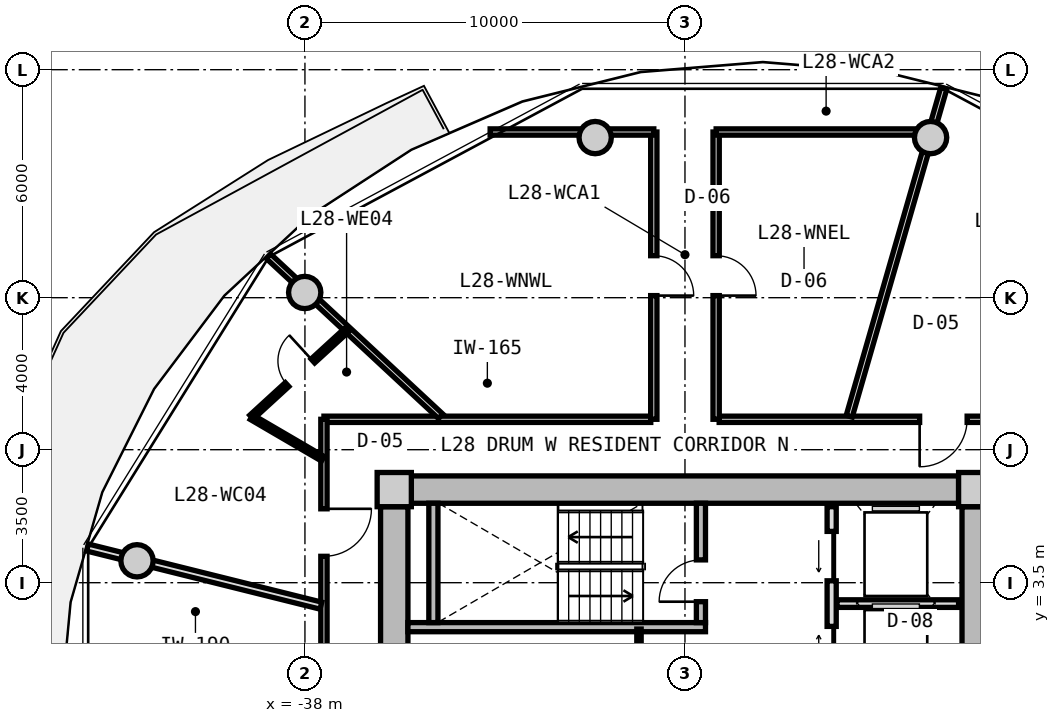
"""IFC4 building model, lengths in metres.
Left out: names, types, materials, properties, quantities, classifications, styles, units other than length and angle.
Written with IfcOpenShell. Run it as: python <this file> out.ifc"""

import sys

from ifc_helpers import new_model, si_unit, direction, frame, frame_2d, origin, origin_2d, place, context, subcontext, project, spatial, rectangle, circle, extrude, source, transform, mapped, element, fill, save


model = new_model("IFC4")
c1 = context("Model", 3, precision=1e-05, world=origin(), true_north=direction((0.0, 1.0)))
c2 = subcontext(c1, "Body", "Model", "MODEL_VIEW")
j1 = project(units=[si_unit("LENGTHUNIT", "METRE"), si_unit("PLANEANGLEUNIT", "RADIAN")], contexts=[c1])
p1 = place(None, origin())
s1 = spatial("IfcSite", under=j1, at=p1, CompositionType="ELEMENT")
p2 = place(p1, origin())
s2 = spatial("IfcBuilding", under=s1, at=p2, CompositionType="ELEMENT")
p3 = place(p2, frame((0.0, 0.0, 93.2)))
s3 = spatial("IfcBuildingStorey", under=s2, at=p3, CompositionType="ELEMENT", Elevation=93.2)
m1 = source(origin(), c2, "Body", "SweptSolid", [
    extrude(rectangle(XDim=0.9, YDim=0.9, at=origin_2d()), origin(), (0.0, 0.0, 1.0), 3.05),
])
for number, where, z_axis, x_axis in (
    (1, (-20.35, 5.95, 0.0), (0.0, 0.0, 1.0), (1.0, 0.0, 0.0)),
    (2, (-35.65, 5.95, 0.0), (0.0, 0.0, 1.0), (1.0, 0.0, 0.0)),
):
    element("IfcColumn", number, at=place(p3, frame(where, z_axis=z_axis, x_axis=x_axis)), inside=s3, PredefinedType="COLUMN", context=c2, shape_type="MappedRepresentation", body=[
        mapped(m1, transform((0.0, 0.0, 0.0), x_axis=(1.0, 0.0, 0.0), y_axis=(0.0, 1.0, 0.0), z_axis=(0.0, 0.0, 1.0), scale=1.0)),
    ])
m2 = source(origin(), c2, "Body", "SweptSolid", [
    extrude(rectangle(XDim=14.4, YDim=0.72, at=frame_2d((7.2, 0.0))), origin(), (0.0, 0.0, 1.0), 2.79),
])
p4 = place(p3, frame((-35.2, 5.95, 0.0), z_axis=(0.0, 0.0, 1.0), x_axis=(1.0, 0.0, 0.0)))
e3 = element("IfcWall", 3, at=p4, inside=s3, PredefinedType="SHEAR", context=c2, shape_type="MappedRepresentation", body=[
    mapped(m2, transform((0.0, 0.0, 0.0), x_axis=(1.0, 0.0, 0.0), y_axis=(0.0, 1.0, 0.0), z_axis=(0.0, 0.0, 1.0), scale=1.0)),
])
m3 = source(origin(), c2, "Body", "SweptSolid", [
    extrude(rectangle(XDim=11.0, YDim=0.72, at=frame_2d((5.5, 0.0))), origin(), (0.0, 0.0, 1.0), 2.79),
])
p5 = place(p3, frame((-35.65, -5.5, 0.0), z_axis=(0.0, 0.0, 1.0), x_axis=(0.0, 1.0, 0.0)))
e4 = element("IfcWall", 4, at=p5, inside=s3, PredefinedType="SHEAR", context=c2, shape_type="MappedRepresentation", body=[
    mapped(m3, transform((0.0, 0.0, 0.0), x_axis=(1.0, 0.0, 0.0), y_axis=(0.0, 1.0, 0.0), z_axis=(0.0, 0.0, 1.0), scale=1.0)),
])
p6 = place(p5, frame((3.8, 0.0, 0.0)))
e5 = element("IfcOpeningElement", 5, at=p6, cuts=e4, PredefinedType="OPENING", context=c2, shape_type="SweptSolid", body=[
    extrude(rectangle(XDim=1.2, YDim=2.15, at=frame_2d((0.6, 1.075))), frame((0.0, 0.37, 0.0), z_axis=(0.0, -1.0, 0.0), x_axis=(1.0, 0.0, 0.0)), (0.0, 0.0, 1.0), 0.74),
])
p7 = place(p3, frame((-20.35, 5.5, 0.0), z_axis=(0.0, 0.0, 1.0), x_axis=(0.0, -1.0, 0.0)))
e6 = element("IfcWall", 6, at=p7, inside=s3, PredefinedType="SHEAR", context=c2, shape_type="MappedRepresentation", body=[
    mapped(m3, transform((0.0, 0.0, 0.0), x_axis=(1.0, 0.0, 0.0), y_axis=(0.0, 1.0, 0.0), z_axis=(0.0, 0.0, 1.0), scale=1.0)),
])
p8 = place(p7, frame((5.65, 0.0, 0.0)))
e7 = element("IfcOpeningElement", 7, at=p8, cuts=e6, PredefinedType="OPENING", context=c2, shape_type="SweptSolid", body=[
    extrude(rectangle(XDim=1.2, YDim=2.15, at=frame_2d((0.6, 1.075))), frame((0.0, 0.37, 0.0), z_axis=(0.0, -1.0, 0.0), x_axis=(1.0, 0.0, 0.0)), (0.0, 0.0, 1.0), 0.74),
])
p9 = place(p7, frame((9.3, 0.0, 0.0)))
e8 = element("IfcOpeningElement", 8, at=p9, cuts=e6, PredefinedType="OPENING", context=c2, shape_type="SweptSolid", body=[
    extrude(rectangle(XDim=1.0, YDim=2.1, at=frame_2d((0.5, 1.05))), frame((0.0, 0.37, 0.0), z_axis=(0.0, -1.0, 0.0), x_axis=(1.0, 0.0, 0.0)), (0.0, 0.0, 1.0), 0.74),
])
m4 = source(origin(), c2, "Body", "SweptSolid", [
    extrude(circle(Radius=0.425, at=origin_2d()), origin(), (0.0, 0.0, 1.0), 3.05),
])
for number, where, z_axis, x_axis in (
    (9, (-21.537, 15.213, 0.0), (0.0, 0.0, 1.0), (1.0, 0.0, 0.0)),
    (10, (-30.363, 15.213, 0.0), (0.0, 0.0, 1.0), (1.0, 0.0, 0.0)),
    (11, (-38.006, 11.137, 0.0), (0.0, 0.0, 1.0), (1.0, 0.0, 0.0)),
    (12, (-42.419, 4.076, 0.0), (0.0, 0.0, 1.0), (1.0, 0.0, 0.0)),
):
    element("IfcColumn", number, at=place(p3, frame(where, z_axis=z_axis, x_axis=x_axis)), inside=s3, PredefinedType="COLUMN", context=c2, shape_type="MappedRepresentation", body=[
        mapped(m4, transform((0.0, 0.0, 0.0), x_axis=(1.0, 0.0, 0.0), y_axis=(0.0, 1.0, 0.0), z_axis=(0.0, 0.0, 1.0), scale=1.0)),
    ])
m5 = source(origin(), c2, "Body", "SweptSolid", [
    extrude(rectangle(XDim=7.83, YDim=0.24, at=frame_2d((3.915, 0.0))), origin(), (0.0, 0.0, 1.0), 2.79),
])
p10 = place(p3, frame((-35.29, 2.33, 0.0), z_axis=(0.0, 0.0, 1.0), x_axis=(1.0, 0.0, 0.0)))
e13 = element("IfcWall", 13, at=p10, inside=s3, PredefinedType="PARTITIONING", context=c2, shape_type="MappedRepresentation", body=[
    mapped(m5, transform((0.0, 0.0, 0.0), x_axis=(1.0, 0.0, 0.0), y_axis=(0.0, 1.0, 0.0), z_axis=(0.0, 0.0, 1.0), scale=1.0)),
])
m6 = source(origin(), c2, "Body", "SweptSolid", [
    extrude(rectangle(XDim=3.14, YDim=0.24, at=frame_2d((1.57, 0.0))), origin(), (0.0, 0.0, 1.0), 2.79),
])
p11 = place(p3, frame((-34.62, 2.45, 0.0), z_axis=(0.0, 0.0, 1.0), x_axis=(0.0, 1.0, 0.0)))
e14 = element("IfcWall", 14, at=p11, inside=s3, PredefinedType="PARTITIONING", context=c2, shape_type="MappedRepresentation", body=[
    mapped(m6, transform((0.0, 0.0, 0.0), x_axis=(1.0, 0.0, 0.0), y_axis=(0.0, 1.0, 0.0), z_axis=(0.0, 0.0, 1.0), scale=1.0)),
])
p12 = place(p3, frame((-27.58, 2.45, 0.0), z_axis=(0.0, 0.0, 1.0), x_axis=(0.0, 1.0, 0.0)))
e15 = element("IfcWall", 15, at=p12, inside=s3, PredefinedType="PARTITIONING", context=c2, shape_type="MappedRepresentation", body=[
    mapped(m6, transform((0.0, 0.0, 0.0), x_axis=(1.0, 0.0, 0.0), y_axis=(0.0, 1.0, 0.0), z_axis=(0.0, 0.0, 1.0), scale=1.0)),
])
p13 = place(p12, frame((0.55, 0.0, 0.0)))
e16 = element("IfcOpeningElement", 16, at=p13, cuts=e15, PredefinedType="OPENING", context=c2, shape_type="SweptSolid", body=[
    extrude(rectangle(XDim=1.1, YDim=2.15, at=frame_2d((0.55, 1.075))), frame((0.0, 0.13, 0.0), z_axis=(0.0, -1.0, 0.0), x_axis=(1.0, 0.0, 0.0)), (0.0, 0.0, 1.0), 0.26),
])
m7 = source(origin(), c2, "Body", "SweptSolid", [
    extrude(rectangle(XDim=5.0, YDim=0.24, at=frame_2d((2.5, 0.0))), origin(), (0.0, 0.0, 1.0), 2.775),
])
p14 = place(p3, frame((-24.14, 0.5, 0.0), z_axis=(0.0, 0.0, 1.0), x_axis=(0.0, 1.0, 0.0)))
e17 = element("IfcWall", 17, at=p14, inside=s3, PredefinedType="PARTITIONING", context=c2, shape_type="MappedRepresentation", body=[
    mapped(m7, transform((0.0, 0.0, 0.0), x_axis=(1.0, 0.0, 0.0), y_axis=(0.0, 1.0, 0.0), z_axis=(0.0, 0.0, 1.0), scale=1.0)),
])
p15 = place(p14, frame((3.05, 0.0, 0.0)))
e18 = element("IfcOpeningElement", 18, at=p15, cuts=e17, PredefinedType="OPENING", context=c2, shape_type="SweptSolid", body=[
    extrude(rectangle(XDim=1.3, YDim=2.2, at=frame_2d((0.65, 1.1))), frame((0.0, 0.13, 0.0), z_axis=(0.0, -1.0, 0.0), x_axis=(1.0, 0.0, 0.0)), (0.0, 0.0, 1.0), 0.26),
])
p16 = place(p14, frame((0.55, 0.0, 0.0)))
e19 = element("IfcOpeningElement", 19, at=p16, cuts=e17, PredefinedType="OPENING", context=c2, shape_type="SweptSolid", body=[
    extrude(rectangle(XDim=1.3, YDim=2.2, at=frame_2d((0.65, 1.1))), frame((0.0, 0.13, 0.0), z_axis=(0.0, -1.0, 0.0), x_axis=(1.0, 0.0, 0.0)), (0.0, 0.0, 1.0), 0.26),
])
m8 = source(origin(), c2, "Body", "SweptSolid", [
    extrude(rectangle(XDim=3.2, YDim=0.2, at=frame_2d((1.6, 0.0))), origin(), (0.0, 0.0, 1.0), 2.775),
])
p17 = place(p3, frame((-24.0, 2.95, 0.0), z_axis=(0.0, 0.0, 1.0), x_axis=(1.0, 0.0, 0.0)))
e20 = element("IfcWall", 20, at=p17, inside=s3, PredefinedType="PARTITIONING", context=c2, shape_type="MappedRepresentation", body=[
    mapped(m8, transform((0.0, 0.0, 0.0), x_axis=(1.0, 0.0, 0.0), y_axis=(0.0, 1.0, 0.0), z_axis=(0.0, 0.0, 1.0), scale=1.0)),
])
m9 = source(origin(), c2, "Body", "SweptSolid", [
    extrude(rectangle(XDim=2.33, YDim=0.115, at=frame_2d((1.165, 0.0))), origin(), (0.0, 0.0, 1.0), 2.775),
])
p18 = place(p3, frame((-29.21, -0.05, 0.0), z_axis=(0.0, 0.0, 1.0), x_axis=(0.0, 1.0, 0.0)))
e21 = element("IfcWall", 21, at=p18, inside=s3, PredefinedType="PARTITIONING", context=c2, shape_type="MappedRepresentation", body=[
    mapped(m9, transform((0.0, 0.0, 0.0), x_axis=(1.0, 0.0, 0.0), y_axis=(0.0, 1.0, 0.0), z_axis=(0.0, 0.0, 1.0), scale=1.0)),
])
m10 = source(origin(), c2, "Body", "SweptSolid", [
    extrude(rectangle(XDim=8.6, YDim=0.165, at=frame_2d((4.3, 0.0))), origin(), (0.0, 0.0, 1.0), 2.775),
])
p19 = place(p3, frame((-37.5, 7.8, 0.0), z_axis=(0.0, 0.0, 1.0), x_axis=(1.0, 0.0, 0.0)))
e22 = element("IfcWall", 22, at=p19, inside=s3, PredefinedType="PARTITIONING", context=c2, shape_type="MappedRepresentation", body=[
    mapped(m10, transform((0.0, 0.0, 0.0), x_axis=(1.0, 0.0, 0.0), y_axis=(0.0, 1.0, 0.0), z_axis=(0.0, 0.0, 1.0), scale=1.0)),
])
p20 = place(p3, frame((-27.1, 7.8, 0.0), z_axis=(0.0, 0.0, 1.0), x_axis=(1.0, 0.0, 0.0)))
e23 = element("IfcWall", 23, at=p20, inside=s3, PredefinedType="PARTITIONING", context=c2, shape_type="MappedRepresentation", body=[
    mapped(m10, transform((0.0, 0.0, 0.0), x_axis=(1.0, 0.0, 0.0), y_axis=(0.0, 1.0, 0.0), z_axis=(0.0, 0.0, 1.0), scale=1.0)),
])
p21 = place(p20, frame((5.275, 0.0, 0.0)))
e24 = element("IfcOpeningElement", 24, at=p21, cuts=e23, PredefinedType="OPENING", context=c2, shape_type="SweptSolid", body=[
    extrude(rectangle(XDim=1.25, YDim=2.2, at=frame_2d((0.625, 1.1))), frame((0.0, 0.093, 0.0), z_axis=(0.0, -1.0, 0.0), x_axis=(1.0, 0.0, 0.0)), (0.0, 0.0, 1.0), 0.185),
])
m11 = source(origin(), c2, "Body", "SweptSolid", [
    extrude(rectangle(XDim=15.6, YDim=0.165, at=frame_2d((7.8, 0.0))), origin(), (0.0, 0.0, 1.0), 2.775),
])
p22 = place(p3, frame((-37.5, -7.8, 0.0), z_axis=(0.0, 0.0, 1.0), x_axis=(0.0, 1.0, 0.0)))
e25 = element("IfcWall", 25, at=p22, inside=s3, PredefinedType="PARTITIONING", context=c2, shape_type="MappedRepresentation", body=[
    mapped(m11, transform((0.0, 0.0, 0.0), x_axis=(1.0, 0.0, 0.0), y_axis=(0.0, 1.0, 0.0), z_axis=(0.0, 0.0, 1.0), scale=1.0)),
])
p23 = place(p22, frame((11.994, 0.0, 0.0)))
e26 = element("IfcOpeningElement", 26, at=p23, cuts=e25, PredefinedType="OPENING", context=c2, shape_type="SweptSolid", body=[
    extrude(rectangle(XDim=1.25, YDim=2.2, at=frame_2d((0.625, 1.1))), frame((0.0, 0.093, 0.0), z_axis=(0.0, -1.0, 0.0), x_axis=(1.0, 0.0, 0.0)), (0.0, 0.0, 1.0), 0.185),
])
p24 = place(p22, frame((4.867, 0.0, 0.0)))
e27 = element("IfcOpeningElement", 27, at=p24, cuts=e25, PredefinedType="OPENING", context=c2, shape_type="SweptSolid", body=[
    extrude(rectangle(XDim=1.25, YDim=2.2, at=frame_2d((0.625, 1.1))), frame((0.0, 0.093, 0.0), z_axis=(0.0, -1.0, 0.0), x_axis=(1.0, 0.0, 0.0)), (0.0, 0.0, 1.0), 0.185),
])
m12 = source(origin(), c2, "Body", "SweptSolid", [
    extrude(rectangle(XDim=8.989, YDim=0.165, at=frame_2d((4.495, 0.0))), origin(), (0.0, 0.0, 1.0), 2.275),
])
p25 = place(p3, frame((-23.678, 7.88, 0.0), z_axis=(0.0, 0.0, 1.0), x_axis=(0.27702323008, 0.960863221274, 0.0)))
e28 = element("IfcWall", 28, at=p25, inside=s3, PredefinedType="PARTITIONING", context=c2, shape_type="MappedRepresentation", body=[
    mapped(m12, transform((0.0, 0.0, 0.0), x_axis=(1.0, 0.0, 0.0), y_axis=(0.0, 1.0, 0.0), z_axis=(0.0, 0.0, 1.0), scale=1.0)),
])
m13 = source(origin(), c2, "Body", "SweptSolid", [
    extrude(rectangle(XDim=6.187, YDim=0.165, at=frame_2d((3.093, 0.0))), origin(), (0.0, 0.0, 1.0), 2.275),
])
p26 = place(p3, frame((-34.429, 7.88, 0.0), z_axis=(0.0, 0.0, 1.0), x_axis=(-0.732501077882, 0.680765870841, 0.0)))
e29 = element("IfcWall", 29, at=p26, inside=s3, PredefinedType="PARTITIONING", context=c2, shape_type="MappedRepresentation", body=[
    mapped(m13, transform((0.0, 0.0, 0.0), x_axis=(1.0, 0.0, 0.0), y_axis=(0.0, 1.0, 0.0), z_axis=(0.0, 0.0, 1.0), scale=1.0)),
])
m14 = source(origin(), c2, "Body", "SweptSolid", [
    extrude(rectangle(XDim=7.56, YDim=0.165, at=frame_2d((3.78, 0.0))), origin(), (0.0, 0.0, 1.0), 2.775),
])
p27 = place(p3, frame((-28.82, 7.8, 0.0), z_axis=(0.0, 0.0, 1.0), x_axis=(0.0, 1.0, 0.0)))
e30 = element("IfcWall", 30, at=p27, inside=s3, PredefinedType="PARTITIONING", context=c2, shape_type="MappedRepresentation", body=[
    mapped(m14, transform((0.0, 0.0, 0.0), x_axis=(1.0, 0.0, 0.0), y_axis=(0.0, 1.0, 0.0), z_axis=(0.0, 0.0, 1.0), scale=1.0)),
])
p28 = place(p27, frame((3.255, 0.0, 0.0)))
e31 = element("IfcOpeningElement", 31, at=p28, cuts=e30, PredefinedType="OPENING", context=c2, shape_type="SweptSolid", body=[
    extrude(rectangle(XDim=1.05, YDim=2.15, at=frame_2d((0.525, 1.075))), frame((0.0, 0.093, 0.0), z_axis=(0.0, -1.0, 0.0), x_axis=(1.0, 0.0, 0.0)), (0.0, 0.0, 1.0), 0.185),
])
m15 = source(origin(), c2, "Body", "SweptSolid", [
    extrude(rectangle(XDim=4.307, YDim=0.165, at=frame_2d((2.153, 0.0))), origin(), (0.0, 0.0, 1.0), 2.275),
])
p29 = place(p3, frame((-33.127, 15.36, 0.0), z_axis=(0.0, 0.0, 1.0), x_axis=(1.0, 0.0, 0.0)))
e32 = element("IfcWall", 32, at=p29, inside=s3, PredefinedType="PARTITIONING", context=c2, shape_type="MappedRepresentation", body=[
    mapped(m15, transform((0.0, 0.0, 0.0), x_axis=(1.0, 0.0, 0.0), y_axis=(0.0, 1.0, 0.0), z_axis=(0.0, 0.0, 1.0), scale=1.0)),
])
p30 = place(p3, frame((-27.18, 7.8, 0.0), z_axis=(0.0, 0.0, 1.0), x_axis=(0.0, 1.0, 0.0)))
e33 = element("IfcWall", 33, at=p30, inside=s3, PredefinedType="PARTITIONING", context=c2, shape_type="MappedRepresentation", body=[
    mapped(m14, transform((0.0, 0.0, 0.0), x_axis=(1.0, 0.0, 0.0), y_axis=(0.0, 1.0, 0.0), z_axis=(0.0, 0.0, 1.0), scale=1.0)),
])
p31 = place(p30, frame((3.255, 0.0, 0.0)))
e34 = element("IfcOpeningElement", 34, at=p31, cuts=e33, PredefinedType="OPENING", context=c2, shape_type="SweptSolid", body=[
    extrude(rectangle(XDim=1.05, YDim=2.15, at=frame_2d((0.525, 1.075))), frame((0.0, 0.093, 0.0), z_axis=(0.0, -1.0, 0.0), x_axis=(1.0, 0.0, 0.0)), (0.0, 0.0, 1.0), 0.185),
])
m16 = source(origin(), c2, "Body", "SweptSolid", [
    extrude(rectangle(XDim=5.814, YDim=0.165, at=frame_2d((2.907, 0.0))), origin(), (0.0, 0.0, 1.0), 2.275),
])
p32 = place(p3, frame((-27.18, 15.36, 0.0), z_axis=(0.0, 0.0, 1.0), x_axis=(1.0, 0.0, 0.0)))
e35 = element("IfcWall", 35, at=p32, inside=s3, PredefinedType="PARTITIONING", context=c2, shape_type="MappedRepresentation", body=[
    mapped(m16, transform((0.0, 0.0, 0.0), x_axis=(1.0, 0.0, 0.0), y_axis=(0.0, 1.0, 0.0), z_axis=(0.0, 0.0, 1.0), scale=1.0)),
])
m17 = source(origin(), c2, "Body", "SweptSolid", [
    extrude(rectangle(XDim=6.331, YDim=0.19, at=frame_2d((3.165, 0.0))), origin(), (0.0, 0.0, 1.0), 2.275),
])
p33 = place(p3, frame((-37.58, 2.896, 0.0), z_axis=(0.0, 0.0, 1.0), x_axis=(-0.97036440661, 0.241646267062, 0.0)))
e36 = element("IfcWall", 36, at=p33, inside=s3, PredefinedType="PARTITIONING", context=c2, shape_type="MappedRepresentation", body=[
    mapped(m17, transform((0.0, 0.0, 0.0), x_axis=(1.0, 0.0, 0.0), y_axis=(0.0, 1.0, 0.0), z_axis=(0.0, 0.0, 1.0), scale=1.0)),
])
m18 = source(origin(), c2, "Body", "SweptSolid", [
    extrude(rectangle(XDim=2.172, YDim=0.14, at=frame_2d((1.086, 0.0))), origin(), (0.0, 0.0, 1.0), 2.775),
])
p34 = place(p3, frame((-37.53, 6.762, 0.0), z_axis=(0.0, 0.0, 1.0), x_axis=(-0.863562702562, 0.504241468688, 0.0)))
e37 = element("IfcWall", 37, at=p34, inside=s3, PredefinedType="PARTITIONING", context=c2, shape_type="MappedRepresentation", body=[
    mapped(m18, transform((0.0, 0.0, 0.0), x_axis=(1.0, 0.0, 0.0), y_axis=(0.0, 1.0, 0.0), z_axis=(0.0, 0.0, 1.0), scale=1.0)),
])
m19 = source(origin(), c2, "Body", "SweptSolid", [
    extrude(rectangle(XDim=3.457, YDim=0.14, at=frame_2d((1.729, 0.0))), origin(), (0.0, 0.0, 1.0), 2.775),
])
p35 = place(p3, frame((-39.405, 7.857, 0.0), z_axis=(0.0, 0.0, 1.0), x_axis=(0.737567375492, 0.675273549467, 0.0)))
e38 = element("IfcWall", 38, at=p35, inside=s3, PredefinedType="PARTITIONING", context=c2, shape_type="MappedRepresentation", body=[
    mapped(m19, transform((0.0, 0.0, 0.0), x_axis=(1.0, 0.0, 0.0), y_axis=(0.0, 1.0, 0.0), z_axis=(0.0, 0.0, 1.0), scale=1.0)),
])
p36 = place(p35, frame((1.268, 0.0, 0.0)))
e39 = element("IfcOpeningElement", 39, at=p36, cuts=e38, PredefinedType="OPENING", context=c2, shape_type="SweptSolid", body=[
    extrude(rectangle(XDim=0.92, YDim=2.1, at=frame_2d((0.46, 1.05))), frame((0.0, 0.08, 0.0), z_axis=(0.0, -1.0, 0.0), x_axis=(1.0, 0.0, 0.0)), (0.0, 0.0, 1.0), 0.16),
])
m20 = source(origin(), c2, "Body", "SweptSolid", [
    extrude(rectangle(XDim=1.1, YDim=2.15, at=frame_2d((0.55, 1.075))), frame((0.0, 0.025, 0.0), z_axis=(0.0, -1.0, 0.0), x_axis=(1.0, 0.0, 0.0)), (0.0, 0.0, 1.0), 0.05),
])
p37 = place(p13, origin())
e40 = element("IfcDoor", 40, at=p37, inside=s3, OperationType="SINGLE_SWING_LEFT", PredefinedType="DOOR", context=c2, shape_type="MappedRepresentation", body=[
    mapped(m20, transform((0.0, 0.0, 0.0), x_axis=(1.0, 0.0, 0.0), y_axis=(0.0, 1.0, 0.0), z_axis=(0.0, 0.0, 1.0), scale=1.0)),
])
fill(e16, e40)
m21 = source(origin(), c2, "Body", "SweptSolid", [
    extrude(rectangle(XDim=1.3, YDim=2.2, at=frame_2d((0.65, 1.1))), frame((0.0, 0.025, 0.0), z_axis=(0.0, -1.0, 0.0), x_axis=(1.0, 0.0, 0.0)), (0.0, 0.0, 1.0), 0.05),
])
p38 = place(p15, origin())
e41 = element("IfcDoor", 41, at=p38, inside=s3, OperationType="SLIDING_TO_LEFT", PredefinedType="DOOR", context=c2, shape_type="MappedRepresentation", body=[
    mapped(m21, transform((0.0, 0.0, 0.0), x_axis=(1.0, 0.0, 0.0), y_axis=(0.0, 1.0, 0.0), z_axis=(0.0, 0.0, 1.0), scale=1.0)),
])
fill(e18, e41)
p39 = place(p16, origin())
e42 = element("IfcDoor", 42, at=p39, inside=s3, OperationType="SLIDING_TO_RIGHT", PredefinedType="DOOR", context=c2, shape_type="MappedRepresentation", body=[
    mapped(m21, transform((0.0, 0.0, 0.0), x_axis=(1.0, 0.0, 0.0), y_axis=(0.0, 1.0, 0.0), z_axis=(0.0, 0.0, 1.0), scale=1.0)),
])
fill(e19, e42)
m22 = source(origin(), c2, "Body", "SweptSolid", [
    extrude(rectangle(XDim=1.05, YDim=2.15, at=frame_2d((0.525, 1.075))), frame((0.0, 0.025, 0.0), z_axis=(0.0, -1.0, 0.0), x_axis=(1.0, 0.0, 0.0)), (0.0, 0.0, 1.0), 0.05),
])
p40 = place(p28, frame((1.05, 0.0, 0.0), z_axis=(0.0, 0.0, 1.0), x_axis=(-1.0, 0.0, 0.0)))
e43 = element("IfcDoor", 43, at=p40, inside=s3, OperationType="SINGLE_SWING_RIGHT", PredefinedType="DOOR", context=c2, shape_type="MappedRepresentation", body=[
    mapped(m22, transform((0.0, 0.0, 0.0), x_axis=(1.0, 0.0, 0.0), y_axis=(0.0, 1.0, 0.0), z_axis=(0.0, 0.0, 1.0), scale=1.0)),
])
fill(e31, e43)
p41 = place(p31, frame((1.05, 0.0, 0.0), z_axis=(0.0, 0.0, 1.0), x_axis=(-1.0, 0.0, 0.0)))
e44 = element("IfcDoor", 44, at=p41, inside=s3, OperationType="SINGLE_SWING_RIGHT", PredefinedType="DOOR", context=c2, shape_type="MappedRepresentation", body=[
    mapped(m22, transform((0.0, 0.0, 0.0), x_axis=(1.0, 0.0, 0.0), y_axis=(0.0, 1.0, 0.0), z_axis=(0.0, 0.0, 1.0), scale=1.0)),
])
fill(e34, e44)
m23 = source(origin(), c2, "Body", "SweptSolid", [
    extrude(rectangle(XDim=1.25, YDim=2.2, at=frame_2d((0.625, 1.1))), frame((0.0, 0.025, 0.0), z_axis=(0.0, -1.0, 0.0), x_axis=(1.0, 0.0, 0.0)), (0.0, 0.0, 1.0), 0.05),
])
p42 = place(p23, frame((1.25, 0.0, 0.0), z_axis=(0.0, 0.0, 1.0), x_axis=(-1.0, 0.0, 0.0)))
e45 = element("IfcDoor", 45, at=p42, inside=s3, OperationType="SINGLE_SWING_LEFT", PredefinedType="DOOR", context=c2, shape_type="MappedRepresentation", body=[
    mapped(m23, transform((0.0, 0.0, 0.0), x_axis=(1.0, 0.0, 0.0), y_axis=(0.0, 1.0, 0.0), z_axis=(0.0, 0.0, 1.0), scale=1.0)),
])
fill(e26, e45)
m24 = source(origin(), c2, "Body", "SweptSolid", [
    extrude(rectangle(XDim=0.92, YDim=2.1, at=frame_2d((0.46, 1.05))), frame((0.0, 0.025, 0.0), z_axis=(0.0, -1.0, 0.0), x_axis=(1.0, 0.0, 0.0)), (0.0, 0.0, 1.0), 0.05),
])
p43 = place(p36, origin())
e46 = element("IfcDoor", 46, at=p43, inside=s3, OperationType="SINGLE_SWING_RIGHT", PredefinedType="DOOR", context=c2, shape_type="MappedRepresentation", body=[
    mapped(m24, transform((0.0, 0.0, 0.0), x_axis=(1.0, 0.0, 0.0), y_axis=(0.0, 1.0, 0.0), z_axis=(0.0, 0.0, 1.0), scale=1.0)),
])
fill(e39, e46)
p44 = place(p21, frame((1.25, 0.0, 0.0), z_axis=(0.0, 0.0, 1.0), x_axis=(-1.0, 0.0, 0.0)))
e47 = element("IfcDoor", 47, at=p44, inside=s3, OperationType="SINGLE_SWING_RIGHT", PredefinedType="DOOR", context=c2, shape_type="MappedRepresentation", body=[
    mapped(m23, transform((0.0, 0.0, 0.0), x_axis=(1.0, 0.0, 0.0), y_axis=(0.0, 1.0, 0.0), z_axis=(0.0, 0.0, 1.0), scale=1.0)),
])
fill(e24, e47)
save(model, sys.argv[1])
